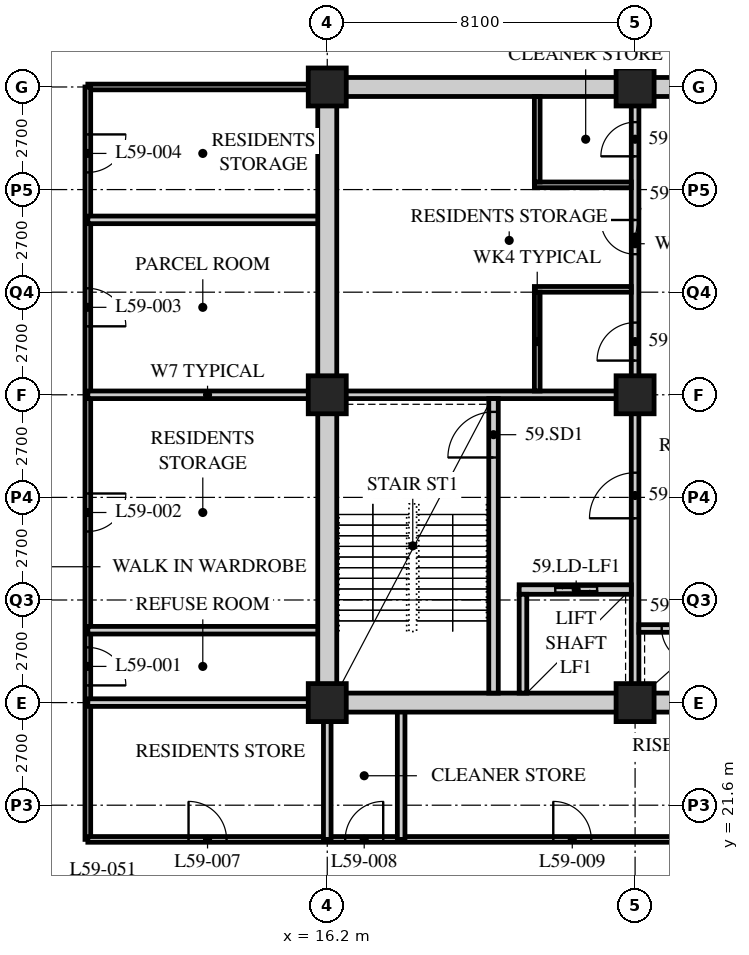
"""IFC4 building model, lengths in metres.
Left out: names, types, materials, properties, quantities, classifications, styles, units other than length and angle.
Written with IfcOpenShell. Run it as: python <this file> out.ifc"""

import sys

from ifc_helpers import new_model, si_unit, direction, frame, frame_2d, origin, origin_2d, place, context, subcontext, project, spatial, rectangle, hollow_rectangle, extrude, element, fill, save


model = new_model("IFC4")
c1 = context("Model", 3, precision=1e-05, world=origin(), true_north=direction((0.0, 1.0)))
c2 = subcontext(c1, "Body", "Model", "MODEL_VIEW")
j1 = project(units=[si_unit("LENGTHUNIT", "METRE"), si_unit("PLANEANGLEUNIT", "RADIAN")], contexts=[c1])
p1 = place(None, origin())
s1 = spatial("IfcSite", under=j1, at=p1, CompositionType="ELEMENT")
p2 = place(p1, origin())
s2 = spatial("IfcBuilding", under=s1, at=p2, CompositionType="ELEMENT")
p3 = place(p2, frame((0.0, 0.0, 228.0)))
s3 = spatial("IfcBuildingStorey", under=s2, at=p3, CompositionType="ELEMENT", Elevation=228.0)
for number, where, z_axis, x_axis in (
    (1, (16.2, 24.3, 0.0), (0.0, 0.0, 1.0), (1.0, 0.0, 0.0)),
    (2, (16.2, 32.4, 0.0), (0.0, 0.0, 1.0), (1.0, 0.0, 0.0)),
    (3, (16.2, 40.5, 0.0), (0.0, 0.0, 1.0), (1.0, 0.0, 0.0)),
    (4, (24.3, 24.3, 0.0), (0.0, 0.0, 1.0), (1.0, 0.0, 0.0)),
    (5, (24.3, 32.4, 0.0), (0.0, 0.0, 1.0), (1.0, 0.0, 0.0)),
    (6, (24.3, 40.5, 0.0), (0.0, 0.0, 1.0), (1.0, 0.0, 0.0)),
):
    element("IfcColumn", number, at=place(p3, frame(where, z_axis=z_axis, x_axis=x_axis)), inside=s3, PredefinedType="COLUMN", context=c2, shape_type="SweptSolid", body=[
        extrude(hollow_rectangle(XDim=1.0, YDim=1.0, WallThickness=0.1, at=origin_2d()), origin(), (0.0, 0.0, 1.0), 3.6),
    ])
p4 = place(p3, frame((16.0, 40.5, 0.0), z_axis=(0.0, 0.0, 1.0), x_axis=(-1.0, 0.0, 0.0)))
e7 = element("IfcWall", 7, at=p4, inside=s3, PredefinedType="PARTITIONING", context=c2, shape_type="SweptSolid", body=[
    extrude(rectangle(XDim=6.1, YDim=0.15, at=frame_2d((3.05, 0.0))), origin(), (0.0, 0.0, 1.0), 3.39),
])
p5 = place(p3, frame((9.9, 40.5, 0.0), z_axis=(0.0, 0.0, 1.0), x_axis=(0.0, -1.0, 0.0)))
e8 = element("IfcWall", 8, at=p5, inside=s3, PredefinedType="PARTITIONING", context=c2, shape_type="SweptSolid", body=[
    extrude(rectangle(XDim=19.8, YDim=0.15, at=frame_2d((9.9, 0.0))), origin(), (0.0, 0.0, 1.0), 3.39),
])
p6 = place(p5, frame((14.748, 0.0, 0.0)))
e9 = element("IfcOpeningElement", 9, at=p6, cuts=e8, PredefinedType="OPENING", context=c2, shape_type="SweptSolid", body=[
    extrude(rectangle(XDim=1.0, YDim=2.1, at=frame_2d((0.5, 1.05))), frame((0.0, 0.085, 0.0), z_axis=(0.0, -1.0, 0.0), x_axis=(1.0, 0.0, 0.0)), (0.0, 0.0, 1.0), 0.17),
])
p7 = place(p5, frame((10.698, 0.0, 0.0)))
e10 = element("IfcOpeningElement", 10, at=p7, cuts=e8, PredefinedType="OPENING", context=c2, shape_type="SweptSolid", body=[
    extrude(rectangle(XDim=1.0, YDim=2.1, at=frame_2d((0.5, 1.05))), frame((0.0, 0.085, 0.0), z_axis=(0.0, -1.0, 0.0), x_axis=(1.0, 0.0, 0.0)), (0.0, 0.0, 1.0), 0.17),
])
p8 = place(p5, frame((5.298, 0.0, 0.0)))
e11 = element("IfcOpeningElement", 11, at=p8, cuts=e8, PredefinedType="OPENING", context=c2, shape_type="SweptSolid", body=[
    extrude(rectangle(XDim=1.0, YDim=2.1, at=frame_2d((0.5, 1.05))), frame((0.0, 0.085, 0.0), z_axis=(0.0, -1.0, 0.0), x_axis=(1.0, 0.0, 0.0)), (0.0, 0.0, 1.0), 0.17),
])
p9 = place(p5, frame((1.248, 0.0, 0.0)))
e12 = element("IfcOpeningElement", 12, at=p9, cuts=e8, PredefinedType="OPENING", context=c2, shape_type="SweptSolid", body=[
    extrude(rectangle(XDim=1.0, YDim=2.1, at=frame_2d((0.5, 1.05))), frame((0.0, 0.085, 0.0), z_axis=(0.0, -1.0, 0.0), x_axis=(1.0, 0.0, 0.0)), (0.0, 0.0, 1.0), 0.17),
])
p10 = place(p3, frame((9.9, 20.7, 0.0), z_axis=(0.0, 0.0, 1.0), x_axis=(1.0, 0.0, 0.0)))
e13 = element("IfcWall", 13, at=p10, inside=s3, PredefinedType="PARTITIONING", context=c2, shape_type="SweptSolid", body=[
    extrude(rectangle(XDim=17.24, YDim=0.15, at=frame_2d((8.62, 0.0))), origin(), (0.0, 0.0, 1.0), 3.39),
])
p11 = place(p10, frame((2.65, 0.0, 0.0)))
e14 = element("IfcOpeningElement", 14, at=p11, cuts=e13, PredefinedType="OPENING", context=c2, shape_type="SweptSolid", body=[
    extrude(rectangle(XDim=1.0, YDim=2.1, at=frame_2d((0.5, 1.05))), frame((0.0, 0.085, 0.0), z_axis=(0.0, -1.0, 0.0), x_axis=(1.0, 0.0, 0.0)), (0.0, 0.0, 1.0), 0.17),
])
p12 = place(p10, frame((6.772, 0.0, 0.0)))
e15 = element("IfcOpeningElement", 15, at=p12, cuts=e13, PredefinedType="OPENING", context=c2, shape_type="SweptSolid", body=[
    extrude(rectangle(XDim=1.0, YDim=2.1, at=frame_2d((0.5, 1.05))), frame((0.0, 0.085, 0.0), z_axis=(0.0, -1.0, 0.0), x_axis=(1.0, 0.0, 0.0)), (0.0, 0.0, 1.0), 0.17),
])
p13 = place(p10, frame((12.247, 0.0, 0.0)))
e16 = element("IfcOpeningElement", 16, at=p13, cuts=e13, PredefinedType="OPENING", context=c2, shape_type="SweptSolid", body=[
    extrude(rectangle(XDim=1.0, YDim=2.1, at=frame_2d((0.5, 1.05))), frame((0.0, 0.085, 0.0), z_axis=(0.0, -1.0, 0.0), x_axis=(1.0, 0.0, 0.0)), (0.0, 0.0, 1.0), 0.17),
])
for number, where, z_axis, x_axis in (
    (17, (9.9, 32.4, 0.0), (0.0, 0.0, 1.0), (1.0, 0.0, 0.0)),
    (18, (9.9, 26.205, 0.0), (0.0, 0.0, 1.0), (1.0, 0.0, 0.0)),
    (19, (9.9, 37.003, 0.0), (0.0, 0.0, 1.0), (1.0, 0.0, 0.0)),
):
    element("IfcWall", number, at=place(p3, frame(where, z_axis=z_axis, x_axis=x_axis)), inside=s3, PredefinedType="SOLIDWALL", context=c2, shape_type="SweptSolid", body=[
        extrude(rectangle(XDim=6.3, YDim=0.2, at=frame_2d((3.15, 0.0))), origin(), (0.0, 0.0, 1.0), 3.39),
    ])
p14 = place(p3, frame((16.2, 20.7, 0.0), z_axis=(0.0, 0.0, 1.0), x_axis=(0.0, 1.0, 0.0)))
e20 = element("IfcWall", 20, at=p14, inside=s3, PredefinedType="SOLIDWALL", context=c2, shape_type="SweptSolid", body=[
    extrude(rectangle(XDim=3.6, YDim=0.2, at=frame_2d((1.8, 0.0))), origin(), (0.0, 0.0, 1.0), 2.628),
])
p15 = place(p3, frame((18.144, 20.7, 0.0), z_axis=(0.0, 0.0, 1.0), x_axis=(0.0, 1.0, 0.0)))
e21 = element("IfcWall", 21, at=p15, inside=s3, PredefinedType="SOLIDWALL", context=c2, shape_type="SweptSolid", body=[
    extrude(rectangle(XDim=3.6, YDim=0.2, at=frame_2d((1.8, 0.0))), origin(), (0.0, 0.0, 1.0), 3.39),
])
p16 = place(p3, frame((9.9, 24.3, 0.0), z_axis=(0.0, 0.0, 1.0), x_axis=(1.0, 0.0, 0.0)))
e22 = element("IfcWall", 22, at=p16, inside=s3, PredefinedType="SOLIDWALL", context=c2, shape_type="SweptSolid", body=[
    extrude(rectangle(XDim=6.3, YDim=0.2, at=frame_2d((3.15, 0.0))), origin(), (0.0, 0.0, 1.0), 3.39),
])
p17 = place(p3, frame((15.95, 24.3, 0.0), z_axis=(0.0, 0.0, 1.0), x_axis=(1.0, 0.0, 0.0)))
e23 = element("IfcWall", 23, at=p17, inside=s3, PredefinedType="SOLIDWALL", context=c2, shape_type="SweptSolid", body=[
    extrude(rectangle(XDim=24.8, YDim=0.5, at=frame_2d((12.4, 0.0))), origin(), (0.0, 0.0, 1.0), 2.628),
])
p18 = place(p17, frame((11.5, 0.0, 0.0)))
e24 = element("IfcOpeningElement", 24, at=p18, cuts=e23, PredefinedType="OPENING", context=c2, shape_type="SweptSolid", body=[
    extrude(rectangle(XDim=1.8, YDim=2.4, at=frame_2d((0.9, 1.2))), frame((0.0, 0.26, 0.0), z_axis=(0.0, -1.0, 0.0), x_axis=(1.0, 0.0, 0.0)), (0.0, 0.0, 1.0), 0.52),
])
p19 = place(p3, frame((15.95, 40.5, 0.0), z_axis=(0.0, 0.0, 1.0), x_axis=(1.0, 0.0, 0.0)))
e25 = element("IfcWall", 25, at=p19, inside=s3, PredefinedType="SOLIDWALL", context=c2, shape_type="SweptSolid", body=[
    extrude(rectangle(XDim=24.8, YDim=0.5, at=frame_2d((12.4, 0.0))), origin(), (0.0, 0.0, 1.0), 2.628),
])
p20 = place(p19, frame((11.5, 0.0, 0.0)))
e26 = element("IfcOpeningElement", 26, at=p20, cuts=e25, PredefinedType="OPENING", context=c2, shape_type="SweptSolid", body=[
    extrude(rectangle(XDim=1.8, YDim=2.4, at=frame_2d((0.9, 1.2))), frame((0.0, 0.26, 0.0), z_axis=(0.0, -1.0, 0.0), x_axis=(1.0, 0.0, 0.0)), (0.0, 0.0, 1.0), 0.52),
])
p21 = place(p3, frame((16.2, 24.55, 0.0), z_axis=(0.0, 0.0, 1.0), x_axis=(0.0, 1.0, 0.0)))
e27 = element("IfcWall", 27, at=p21, inside=s3, PredefinedType="SOLIDWALL", context=c2, shape_type="SweptSolid", body=[
    extrude(rectangle(XDim=15.7, YDim=0.5, at=frame_2d((7.85, 0.0))), origin(), (0.0, 0.0, 1.0), 2.628),
])
p22 = place(p3, frame((16.45, 32.4, 0.0), z_axis=(0.0, 0.0, 1.0), x_axis=(1.0, 0.0, 0.0)))
e28 = element("IfcWall", 28, at=p22, inside=s3, PredefinedType="SOLIDWALL", context=c2, shape_type="SweptSolid", body=[
    extrude(rectangle(XDim=7.95, YDim=0.2, at=frame_2d((3.975, 0.0))), origin(), (0.0, 0.0, 1.0), 2.778),
])
p23 = place(p3, frame((24.3, 24.55, 0.0), z_axis=(0.0, 0.0, 1.0), x_axis=(0.0, 1.0, 0.0)))
e29 = element("IfcWall", 29, at=p23, inside=s3, PredefinedType="SOLIDWALL", context=c2, shape_type="SweptSolid", body=[
    extrude(rectangle(XDim=7.75, YDim=0.2, at=frame_2d((3.875, 0.0))), origin(), (0.0, 0.0, 1.0), 2.778),
])
p24 = place(p23, frame((4.6, 0.0, 0.0)))
e30 = element("IfcOpeningElement", 30, at=p24, cuts=e29, PredefinedType="OPENING", context=c2, shape_type="SweptSolid", body=[
    extrude(rectangle(XDim=1.2, YDim=2.1, at=frame_2d((0.6, 1.05))), frame((0.0, 0.11, 0.0), z_axis=(0.0, -1.0, 0.0), x_axis=(1.0, 0.0, 0.0)), (0.0, 0.0, 1.0), 0.22),
])
p25 = place(p3, frame((20.575, 24.55, 0.0), z_axis=(0.0, 0.0, 1.0), x_axis=(0.0, 1.0, 0.0)))
e31 = element("IfcWall", 31, at=p25, inside=s3, PredefinedType="SOLIDWALL", context=c2, shape_type="SweptSolid", body=[
    extrude(rectangle(XDim=7.75, YDim=0.25, at=frame_2d((3.875, 0.0))), origin(), (0.0, 0.0, 1.0), 3.39),
])
p26 = place(p25, frame((6.2, 0.0, 0.0)))
e32 = element("IfcOpeningElement", 32, at=p26, cuts=e31, PredefinedType="OPENING", context=c2, shape_type="SweptSolid", body=[
    extrude(rectangle(XDim=1.2, YDim=2.1, at=frame_2d((0.6, 1.05))), frame((0.0, 0.135, 0.0), z_axis=(0.0, -1.0, 0.0), x_axis=(1.0, 0.0, 0.0)), (0.0, 0.0, 1.0), 0.27),
])
p27 = place(p3, frame((21.25, 27.275, 0.0), z_axis=(0.0, 0.0, 1.0), x_axis=(1.0, 0.0, 0.0)))
e33 = element("IfcWall", 33, at=p27, inside=s3, PredefinedType="SOLIDWALL", context=c2, shape_type="SweptSolid", body=[
    extrude(rectangle(XDim=2.95, YDim=0.25, at=frame_2d((1.475, 0.0))), origin(), (0.0, 0.0, 1.0), 3.39),
])
p28 = place(p27, frame((0.95, 0.0, 0.0)))
e34 = element("IfcOpeningElement", 34, at=p28, cuts=e33, PredefinedType="OPENING", context=c2, shape_type="SweptSolid", body=[
    extrude(rectangle(XDim=1.1, YDim=2.4, at=frame_2d((0.55, 1.2))), frame((0.0, 0.135, 0.0), z_axis=(0.0, -1.0, 0.0), x_axis=(1.0, 0.0, 0.0)), (0.0, 0.0, 1.0), 0.27),
])
p29 = place(p3, frame((21.35, 24.55, 0.0), z_axis=(0.0, 0.0, 1.0), x_axis=(0.0, 1.0, 0.0)))
e35 = element("IfcWall", 35, at=p29, inside=s3, PredefinedType="SOLIDWALL", context=c2, shape_type="SweptSolid", body=[
    extrude(rectangle(XDim=2.6, YDim=0.2, at=frame_2d((1.3, 0.0))), origin(), (0.0, 0.0, 1.0), 3.39),
])
p30 = place(p3, frame((24.4, 26.25, 0.0), z_axis=(0.0, 0.0, 1.0), x_axis=(1.0, 0.0, 0.0)))
e36 = element("IfcWall", 36, at=p30, inside=s3, PredefinedType="SOLIDWALL", context=c2, shape_type="SweptSolid", body=[
    extrude(rectangle(XDim=2.15, YDim=0.2, at=frame_2d((1.075, 0.0))), origin(), (0.0, 0.0, 1.0), 3.39),
])
p31 = place(p30, frame((0.6, 0.0, 0.0)))
e37 = element("IfcOpeningElement", 37, at=p31, cuts=e36, PredefinedType="OPENING", context=c2, shape_type="SweptSolid", body=[
    extrude(rectangle(XDim=0.9, YDim=2.1, at=frame_2d((0.45, 1.05))), frame((0.0, 0.11, 0.0), z_axis=(0.0, -1.0, 0.0), x_axis=(1.0, 0.0, 0.0)), (0.0, 0.0, 1.0), 0.22),
])
p32 = place(p3, frame((24.3, 32.5, 0.0), z_axis=(0.0, 0.0, 1.0), x_axis=(0.0, 1.0, 0.0)))
e38 = element("IfcWall", 38, at=p32, inside=s3, PredefinedType="PARTITIONING", context=c2, shape_type="SweptSolid", body=[
    extrude(rectangle(XDim=7.75, YDim=0.2, at=frame_2d((3.875, 0.0))), origin(), (0.0, 0.0, 1.0), 2.778),
])
p33 = place(p32, frame((0.8, 0.0, 0.0)))
e39 = element("IfcOpeningElement", 39, at=p33, cuts=e38, PredefinedType="OPENING", context=c2, shape_type="SweptSolid", body=[
    extrude(rectangle(XDim=1.0, YDim=2.1, at=frame_2d((0.5, 1.05))), frame((0.0, 0.11, 0.0), z_axis=(0.0, -1.0, 0.0), x_axis=(1.0, 0.0, 0.0)), (0.0, 0.0, 1.0), 0.22),
])
p34 = place(p32, frame((3.6, 0.0, 0.0)))
e40 = element("IfcOpeningElement", 40, at=p34, cuts=e38, PredefinedType="OPENING", context=c2, shape_type="SweptSolid", body=[
    extrude(rectangle(XDim=0.9, YDim=2.1, at=frame_2d((0.45, 1.05))), frame((0.0, 0.11, 0.0), z_axis=(0.0, -1.0, 0.0), x_axis=(1.0, 0.0, 0.0)), (0.0, 0.0, 1.0), 0.22),
])
p35 = place(p32, frame((6.175, 0.0, 0.0)))
e41 = element("IfcOpeningElement", 41, at=p35, cuts=e38, PredefinedType="OPENING", context=c2, shape_type="SweptSolid", body=[
    extrude(rectangle(XDim=0.9, YDim=2.1, at=frame_2d((0.45, 1.05))), frame((0.0, 0.11, 0.0), z_axis=(0.0, -1.0, 0.0), x_axis=(1.0, 0.0, 0.0)), (0.0, 0.0, 1.0), 0.22),
])
for number, where, z_axis, x_axis in (
    (42, (21.65, 35.175, 0.0), (0.0, 0.0, 1.0), (1.0, 0.0, 0.0)),
    (43, (21.65, 37.925, 0.0), (0.0, 0.0, 1.0), (1.0, 0.0, 0.0)),
):
    element("IfcWall", number, at=place(p3, frame(where, z_axis=z_axis, x_axis=x_axis)), inside=s3, PredefinedType="PARTITIONING", context=c2, shape_type="SweptSolid", body=[
        extrude(rectangle(XDim=2.55, YDim=0.15, at=frame_2d((1.275, 0.0))), origin(), (0.0, 0.0, 1.0), 3.39),
    ])
p36 = place(p3, frame((21.725, 32.5, 0.0), z_axis=(0.0, 0.0, 1.0), x_axis=(0.0, 1.0, 0.0)))
e44 = element("IfcWall", 44, at=p36, inside=s3, PredefinedType="PARTITIONING", context=c2, shape_type="SweptSolid", body=[
    extrude(rectangle(XDim=2.6, YDim=0.15, at=frame_2d((1.3, 0.0))), origin(), (0.0, 0.0, 1.0), 3.39),
])
p37 = place(p3, frame((21.725, 38.0, 0.0), z_axis=(0.0, 0.0, 1.0), x_axis=(0.0, 1.0, 0.0)))
e45 = element("IfcWall", 45, at=p37, inside=s3, PredefinedType="PARTITIONING", context=c2, shape_type="SweptSolid", body=[
    extrude(rectangle(XDim=2.25, YDim=0.15, at=frame_2d((1.125, 0.0))), origin(), (0.0, 0.0, 1.0), 3.39),
])
p38 = place(p6, origin())
e46 = element("IfcDoor", 46, at=p38, inside=s3, OperationType="SINGLE_SWING_RIGHT", PredefinedType="DOOR", context=c2, shape_type="SweptSolid", body=[
    extrude(rectangle(XDim=1.0, YDim=2.1, at=frame_2d((0.5, 1.05))), frame((0.0, 0.025, 0.0), z_axis=(0.0, -1.0, 0.0), x_axis=(1.0, 0.0, 0.0)), (0.0, 0.0, 1.0), 0.05),
])
fill(e9, e46)
p39 = place(p7, origin())
e47 = element("IfcDoor", 47, at=p39, inside=s3, OperationType="SINGLE_SWING_LEFT", PredefinedType="DOOR", context=c2, shape_type="SweptSolid", body=[
    extrude(rectangle(XDim=1.0, YDim=2.1, at=frame_2d((0.5, 1.05))), frame((0.0, 0.025, 0.0), z_axis=(0.0, -1.0, 0.0), x_axis=(1.0, 0.0, 0.0)), (0.0, 0.0, 1.0), 0.05),
])
fill(e10, e47)
p40 = place(p8, origin())
e48 = element("IfcDoor", 48, at=p40, inside=s3, OperationType="SINGLE_SWING_RIGHT", PredefinedType="DOOR", context=c2, shape_type="SweptSolid", body=[
    extrude(rectangle(XDim=1.0, YDim=2.1, at=frame_2d((0.5, 1.05))), frame((0.0, 0.025, 0.0), z_axis=(0.0, -1.0, 0.0), x_axis=(1.0, 0.0, 0.0)), (0.0, 0.0, 1.0), 0.05),
])
fill(e11, e48)
p41 = place(p9, origin())
e49 = element("IfcDoor", 49, at=p41, inside=s3, OperationType="SINGLE_SWING_LEFT", PredefinedType="DOOR", context=c2, shape_type="SweptSolid", body=[
    extrude(rectangle(XDim=1.0, YDim=2.1, at=frame_2d((0.5, 1.05))), frame((0.0, 0.025, 0.0), z_axis=(0.0, -1.0, 0.0), x_axis=(1.0, 0.0, 0.0)), (0.0, 0.0, 1.0), 0.05),
])
fill(e12, e49)
p42 = place(p11, origin())
e50 = element("IfcDoor", 50, at=p42, inside=s3, OperationType="SINGLE_SWING_LEFT", PredefinedType="DOOR", context=c2, shape_type="SweptSolid", body=[
    extrude(rectangle(XDim=1.0, YDim=2.1, at=frame_2d((0.5, 1.05))), frame((0.0, 0.025, 0.0), z_axis=(0.0, -1.0, 0.0), x_axis=(1.0, 0.0, 0.0)), (0.0, 0.0, 1.0), 0.05),
])
fill(e14, e50)
p43 = place(p12, origin())
e51 = element("IfcDoor", 51, at=p43, inside=s3, OperationType="SINGLE_SWING_RIGHT", PredefinedType="DOOR", context=c2, shape_type="SweptSolid", body=[
    extrude(rectangle(XDim=1.0, YDim=2.1, at=frame_2d((0.5, 1.05))), frame((0.0, 0.025, 0.0), z_axis=(0.0, -1.0, 0.0), x_axis=(1.0, 0.0, 0.0)), (0.0, 0.0, 1.0), 0.05),
])
fill(e15, e51)
p44 = place(p13, origin())
e52 = element("IfcDoor", 52, at=p44, inside=s3, OperationType="SINGLE_SWING_LEFT", PredefinedType="DOOR", context=c2, shape_type="SweptSolid", body=[
    extrude(rectangle(XDim=1.0, YDim=2.1, at=frame_2d((0.5, 1.05))), frame((0.0, 0.025, 0.0), z_axis=(0.0, -1.0, 0.0), x_axis=(1.0, 0.0, 0.0)), (0.0, 0.0, 1.0), 0.05),
])
fill(e16, e52)
p45 = place(p33, origin())
e53 = element("IfcDoor", 53, at=p45, inside=s3, OperationType="SINGLE_SWING_LEFT", PredefinedType="DOOR", context=c2, shape_type="SweptSolid", body=[
    extrude(rectangle(XDim=1.0, YDim=2.1, at=frame_2d((0.5, 1.05))), frame((0.0, 0.025, 0.0), z_axis=(0.0, -1.0, 0.0), x_axis=(1.0, 0.0, 0.0)), (0.0, 0.0, 1.0), 0.05),
])
fill(e39, e53)
p46 = place(p34, origin())
e54 = element("IfcDoor", 54, at=p46, inside=s3, OperationType="SINGLE_SWING_RIGHT", PredefinedType="DOOR", context=c2, shape_type="SweptSolid", body=[
    extrude(rectangle(XDim=0.9, YDim=2.1, at=frame_2d((0.45, 1.05))), frame((0.0, 0.025, 0.0), z_axis=(0.0, -1.0, 0.0), x_axis=(1.0, 0.0, 0.0)), (0.0, 0.0, 1.0), 0.05),
])
fill(e40, e54)
p47 = place(p35, origin())
e55 = element("IfcDoor", 55, at=p47, inside=s3, OperationType="SINGLE_SWING_LEFT", PredefinedType="DOOR", context=c2, shape_type="SweptSolid", body=[
    extrude(rectangle(XDim=0.9, YDim=2.1, at=frame_2d((0.45, 1.05))), frame((0.0, 0.025, 0.0), z_axis=(0.0, -1.0, 0.0), x_axis=(1.0, 0.0, 0.0)), (0.0, 0.0, 1.0), 0.05),
])
fill(e41, e55)
p48 = place(p26, origin())
e56 = element("IfcDoor", 56, at=p48, inside=s3, OperationType="SINGLE_SWING_LEFT", PredefinedType="DOOR", context=c2, shape_type="SweptSolid", body=[
    extrude(rectangle(XDim=1.2, YDim=2.1, at=frame_2d((0.6, 1.05))), frame((0.0, 0.025, 0.0), z_axis=(0.0, -1.0, 0.0), x_axis=(1.0, 0.0, 0.0)), (0.0, 0.0, 1.0), 0.05),
])
fill(e32, e56)
p49 = place(p24, origin())
e57 = element("IfcDoor", 57, at=p49, inside=s3, OperationType="SINGLE_SWING_LEFT", PredefinedType="DOOR", context=c2, shape_type="SweptSolid", body=[
    extrude(rectangle(XDim=1.2, YDim=2.1, at=frame_2d((0.6, 1.05))), frame((0.0, 0.025, 0.0), z_axis=(0.0, -1.0, 0.0), x_axis=(1.0, 0.0, 0.0)), (0.0, 0.0, 1.0), 0.05),
])
fill(e30, e57)
p50 = place(p31, origin())
e58 = element("IfcDoor", 58, at=p50, inside=s3, OperationType="SINGLE_SWING_LEFT", PredefinedType="DOOR", context=c2, shape_type="SweptSolid", body=[
    extrude(rectangle(XDim=0.9, YDim=2.1, at=frame_2d((0.45, 1.05))), frame((0.0, 0.025, 0.0), z_axis=(0.0, -1.0, 0.0), x_axis=(1.0, 0.0, 0.0)), (0.0, 0.0, 1.0), 0.05),
])
fill(e37, e58)
p51 = place(p28, origin())
e59 = element("IfcDoor", 59, at=p51, inside=s3, OperationType="DOUBLE_DOOR_SLIDING", PredefinedType="DOOR", context=c2, shape_type="SweptSolid", body=[
    extrude(rectangle(XDim=1.1, YDim=2.4, at=frame_2d((0.55, 1.2))), frame((0.0, 0.025, 0.0), z_axis=(0.0, -1.0, 0.0), x_axis=(1.0, 0.0, 0.0)), (0.0, 0.0, 1.0), 0.05),
])
fill(e34, e59)
save(model, sys.argv[1])
